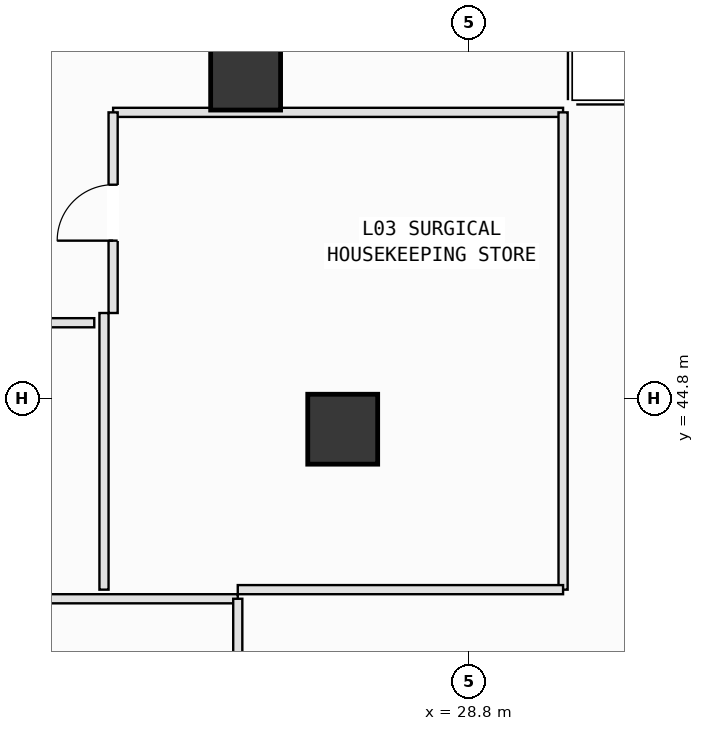
"""IFC4 building model, lengths in metres.
Left out: names, types, materials, properties, quantities, classifications, styles, units other than length and angle.
Written with IfcOpenShell. Run it as: python <this file> out.ifc"""

import sys

from ifc_helpers import new_model, si_unit, direction, frame, frame_2d, origin, origin_2d, place, context, subcontext, project, spatial, rectangle, extrude, element, fill, save


model = new_model("IFC4")
c1 = context("Model", 3, precision=1e-05, world=origin(), true_north=direction((0.0, 1.0)))
c2 = subcontext(c1, "Body", "Model", "MODEL_VIEW")
j1 = project(units=[si_unit("LENGTHUNIT", "METRE"), si_unit("PLANEANGLEUNIT", "RADIAN")], contexts=[c1])
p1 = place(None, origin())
s1 = spatial("IfcSite", under=j1, at=p1, CompositionType="ELEMENT")
p2 = place(p1, origin())
s2 = spatial("IfcBuilding", under=s1, at=p2, CompositionType="ELEMENT")
p3 = place(p2, frame((0.0, 0.0, 16.2)))
s3 = spatial("IfcBuildingStorey", under=s2, at=p3, CompositionType="ELEMENT", Elevation=16.2)
for number, where, z_axis, x_axis in (
    (1, (26.726, 44.289, 0.0), (0.0, 0.0, 1.0), (1.0, 0.0, 0.0)),
    (2, (25.129, 50.113, 0.0), (0.0, 0.0, 1.0), (1.0, 0.0, 0.0)),
):
    element("IfcColumn", number, at=place(p3, frame(where, z_axis=z_axis, x_axis=x_axis)), inside=s3, PredefinedType="COLUMN", context=c2, shape_type="SweptSolid", body=[
        extrude(rectangle(XDim=1.15, YDim=1.15, at=origin_2d()), origin(), (0.0, 0.0, 1.0), 5.4),
    ])
p4 = place(p3, frame((18.15, 41.5, 0.0), z_axis=(0.0, 0.0, 1.0), x_axis=(1.0, 0.0, 0.0)))
e3 = element("IfcWall", 3, at=p4, inside=s3, PredefinedType="PARTITIONING", context=c2, shape_type="SweptSolid", body=[
    extrude(rectangle(XDim=6.85, YDim=0.15, at=frame_2d((3.425, 0.0))), origin(), (0.0, 0.0, 1.0), 5.15),
])
p5 = place(p3, frame((25.0, 41.5, 0.0), z_axis=(0.0, 0.0, 1.0), x_axis=(0.0, -1.0, 0.0)))
e4 = element("IfcWall", 4, at=p5, inside=s3, PredefinedType="PARTITIONING", context=c2, shape_type="SweptSolid", body=[
    extrude(rectangle(XDim=7.15, YDim=0.15, at=frame_2d((3.575, 0.0))), origin(), (0.0, 0.0, 1.0), 5.15),
])
p6 = place(p3, frame((22.8, 46.2, 0.0), z_axis=(0.0, 0.0, 1.0), x_axis=(0.0, -1.0, 0.0)))
e5 = element("IfcWall", 5, at=p6, inside=s3, PredefinedType="PARTITIONING", context=c2, shape_type="SweptSolid", body=[
    extrude(rectangle(XDim=4.55, YDim=0.15, at=frame_2d((2.275, 0.0))), origin(), (0.0, 0.0, 1.0), 5.15),
])
p7 = place(p3, frame((17.91, 46.04, 0.0), z_axis=(0.0, 0.0, 1.0), x_axis=(1.0, 0.0, 0.0)))
e6 = element("IfcWall", 6, at=p7, inside=s3, PredefinedType="PARTITIONING", context=c2, shape_type="SweptSolid", body=[
    extrude(rectangle(XDim=4.73, YDim=0.15, at=frame_2d((2.365, 0.0))), origin(), (0.0, 0.0, 1.0), 5.15),
])
p8 = place(p7, frame((1.835, 0.0, 0.0)))
e7 = element("IfcOpeningElement", 7, at=p8, cuts=e6, PredefinedType="OPENING", context=c2, shape_type="SweptSolid", body=[
    extrude(rectangle(XDim=0.92, YDim=2.1, at=frame_2d((0.46, 1.05))), frame((0.0, 0.085, 0.0), z_axis=(0.0, -1.0, 0.0), x_axis=(1.0, 0.0, 0.0)), (0.0, 0.0, 1.0), 0.17),
])
p9 = place(p3, frame((22.95, 49.5, 0.0), z_axis=(0.0, 0.0, 1.0), x_axis=(1.0, 0.0, 0.0)))
e8 = element("IfcWall", 8, at=p9, inside=s3, PredefinedType="PARTITIONING", context=c2, shape_type="SweptSolid", body=[
    extrude(rectangle(XDim=7.4, YDim=0.15, at=frame_2d((3.7, 0.0))), origin(), (0.0, 0.0, 1.0), 4.235),
])
p10 = place(p3, frame((30.35, 49.5, 0.0), z_axis=(0.0, 0.0, 1.0), x_axis=(0.0, -1.0, 0.0)))
e9 = element("IfcWall", 9, at=p10, inside=s3, PredefinedType="PARTITIONING", context=c2, shape_type="SweptSolid", body=[
    extrude(rectangle(XDim=7.85, YDim=0.15, at=frame_2d((3.925, 0.0))), origin(), (0.0, 0.0, 1.0), 5.15),
])
p11 = place(p3, frame((30.35, 41.65, 0.0), z_axis=(0.0, 0.0, 1.0), x_axis=(-1.0, 0.0, 0.0)))
e10 = element("IfcWall", 10, at=p11, inside=s3, PredefinedType="PARTITIONING", context=c2, shape_type="SweptSolid", body=[
    extrude(rectangle(XDim=5.35, YDim=0.15, at=frame_2d((2.675, 0.0))), origin(), (0.0, 0.0, 1.0), 5.15),
])
p12 = place(p3, frame((22.95, 46.2, 0.0), z_axis=(0.0, 0.0, 1.0), x_axis=(0.0, 1.0, 0.0)))
e11 = element("IfcWall", 11, at=p12, inside=s3, PredefinedType="PARTITIONING", context=c2, shape_type="SweptSolid", body=[
    extrude(rectangle(XDim=3.3, YDim=0.15, at=frame_2d((1.65, 0.0))), origin(), (0.0, 0.0, 1.0), 5.15),
])
p13 = place(p12, frame((1.19, 0.0, 0.0)))
e12 = element("IfcOpeningElement", 12, at=p13, cuts=e11, PredefinedType="OPENING", context=c2, shape_type="SweptSolid", body=[
    extrude(rectangle(XDim=0.92, YDim=2.1, at=frame_2d((0.46, 1.05))), frame((0.0, 0.085, 0.0), z_axis=(0.0, -1.0, 0.0), x_axis=(1.0, 0.0, 0.0)), (0.0, 0.0, 1.0), 0.17),
])
p14 = place(p13, origin())
e13 = element("IfcDoor", 13, at=p14, inside=s3, OperationType="SINGLE_SWING_LEFT", PredefinedType="DOOR", context=c2, shape_type="SweptSolid", body=[
    extrude(rectangle(XDim=0.92, YDim=2.1, at=frame_2d((0.46, 1.05))), frame((0.0, 0.025, 0.0), z_axis=(0.0, -1.0, 0.0), x_axis=(1.0, 0.0, 0.0)), (0.0, 0.0, 1.0), 0.05),
])
fill(e12, e13)
save(model, sys.argv[1])
